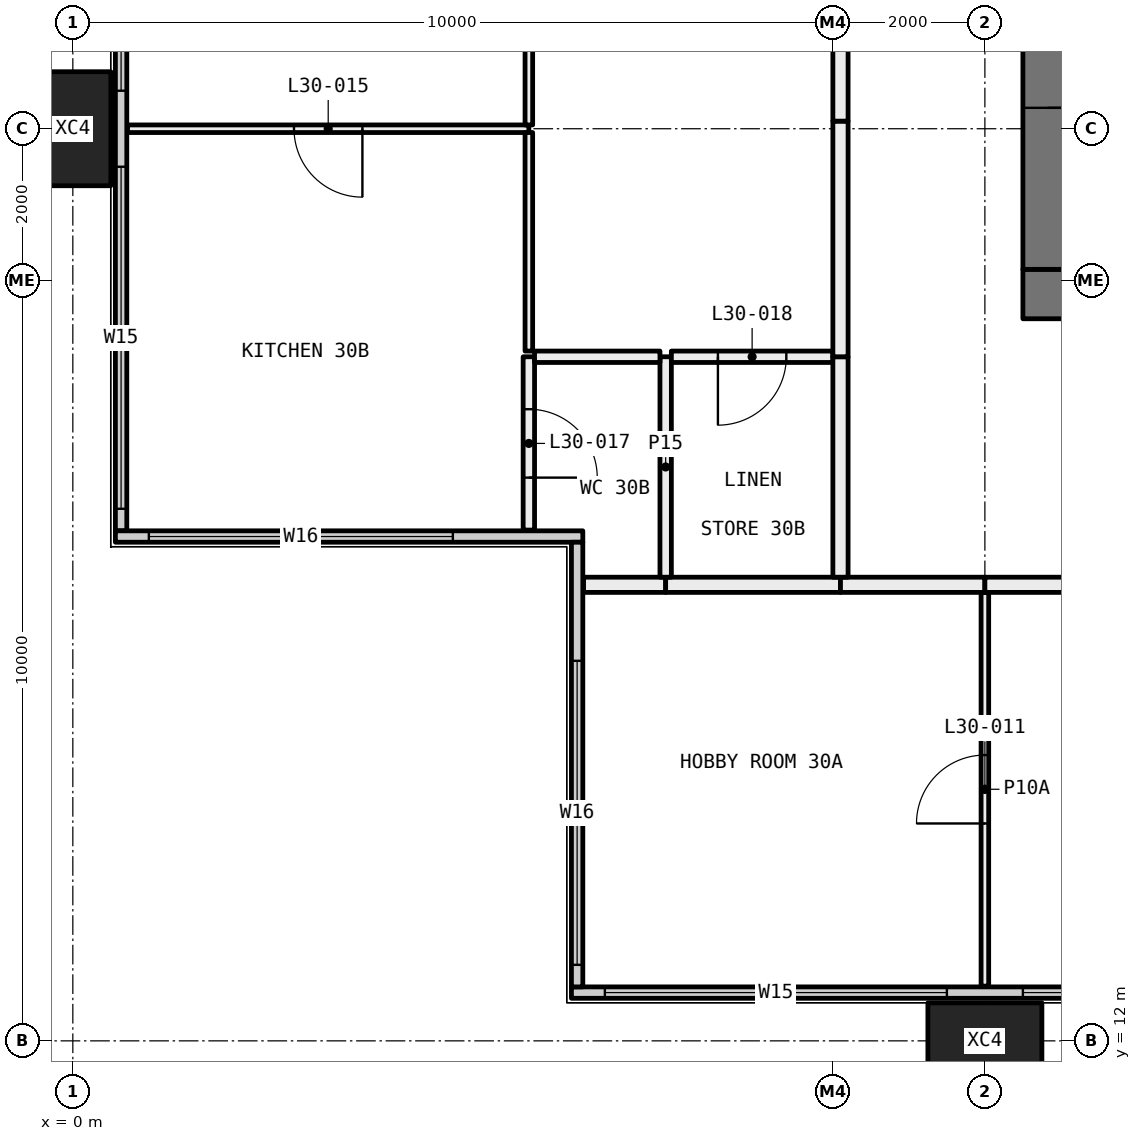
"""IFC4 building model, lengths in metres.
Left out: names, types, materials, properties, quantities, classifications, styles, units other than length and angle.
Written with IfcOpenShell. Run it as: python <this file> out.ifc"""

import sys

from ifc_helpers import new_model, si_unit, direction, frame, frame_2d, origin, origin_2d, place, context, subcontext, project, spatial, rectangle, hollow_rectangle, extrude, element, fill, save


model = new_model("IFC4")
c1 = context("Model", 3, precision=1e-05, world=origin(), true_north=direction((0.0, 1.0)))
c2 = subcontext(c1, "Body", "Model", "MODEL_VIEW")
j1 = project(units=[si_unit("LENGTHUNIT", "METRE"), si_unit("PLANEANGLEUNIT", "RADIAN")], contexts=[c1])
p1 = place(None, origin())
s1 = spatial("IfcSite", under=j1, at=p1, CompositionType="ELEMENT")
p2 = place(p1, origin())
s2 = spatial("IfcBuilding", under=s1, at=p2, CompositionType="ELEMENT")
p3 = place(p2, frame((0.0, 0.0, 117.3)))
s3 = spatial("IfcBuildingStorey", under=s2, at=p3, CompositionType="ELEMENT", Elevation=117.3)
for number, where, z_axis, x_axis in (
    (1, (0.0, 24.0, -0.4), (0.0, 0.0, 1.0), (0.0, 1.0, 0.0)),
    (2, (12.0, 12.0, -0.4), (0.0, 0.0, 1.0), (1.0, 0.0, 0.0)),
):
    element("IfcColumn", number, at=place(p3, frame(where, z_axis=z_axis, x_axis=x_axis)), inside=s3, PredefinedType="COLUMN", context=c2, shape_type="SweptSolid", body=[
        extrude(hollow_rectangle(XDim=1.5, YDim=1.0, WallThickness=0.06, at=origin_2d()), origin(), (0.0, 0.0, 1.0), 3.45),
    ])
p4 = place(p3, frame((6.56, 12.635, 0.0), z_axis=(0.0, 0.0, 1.0), x_axis=(1.0, 0.0, 0.0)))
e3 = element("IfcWall", 3, at=p4, inside=s3, PredefinedType="ELEMENTEDWALL", context=c2, shape_type="SweptSolid", body=[
    extrude(rectangle(XDim=58.88, YDim=0.15, at=frame_2d((29.44, 0.0))), origin(), (0.0, 0.0, 1.0), 3.05),
])
p5 = place(p4, frame((0.44, 0.0, 0.45)))
e4 = element("IfcOpeningElement", 4, at=p5, cuts=e3, PredefinedType="OPENING", context=c2, shape_type="SweptSolid", body=[
    extrude(rectangle(XDim=4.5, YDim=2.55, at=frame_2d((2.25, 1.275))), frame((0.0, 0.085, 0.0), z_axis=(0.0, -1.0, 0.0), x_axis=(1.0, 0.0, 0.0)), (0.0, 0.0, 1.0), 0.17),
])
p6 = place(p4, frame((5.94, 0.0, 0.45)))
e5 = element("IfcOpeningElement", 5, at=p6, cuts=e3, PredefinedType="OPENING", context=c2, shape_type="SweptSolid", body=[
    extrude(rectangle(XDim=1.75, YDim=2.55, at=frame_2d((0.875, 1.275))), frame((0.0, 0.085, 0.0), z_axis=(0.0, -1.0, 0.0), x_axis=(1.0, 0.0, 0.0)), (0.0, 0.0, 1.0), 0.17),
])
p7 = place(p4, frame((15.19, 0.0, 0.45)))
e6 = element("IfcOpeningElement", 6, at=p7, cuts=e3, PredefinedType="OPENING", context=c2, shape_type="SweptSolid", body=[
    extrude(rectangle(XDim=1.75, YDim=2.55, at=frame_2d((0.875, 1.275))), frame((0.0, 0.085, 0.0), z_axis=(0.0, -1.0, 0.0), x_axis=(1.0, 0.0, 0.0)), (0.0, 0.0, 1.0), 0.17),
])
p8 = place(p4, frame((17.94, 0.0, 0.45)))
e7 = element("IfcOpeningElement", 7, at=p8, cuts=e3, PredefinedType="OPENING", context=c2, shape_type="SweptSolid", body=[
    extrude(rectangle(XDim=1.75, YDim=2.55, at=frame_2d((0.875, 1.275))), frame((0.0, 0.085, 0.0), z_axis=(0.0, -1.0, 0.0), x_axis=(1.0, 0.0, 0.0)), (0.0, 0.0, 1.0), 0.17),
])
p9 = place(p4, frame((27.19, 0.0, 0.45)))
e8 = element("IfcOpeningElement", 8, at=p9, cuts=e3, PredefinedType="OPENING", context=c2, shape_type="SweptSolid", body=[
    extrude(rectangle(XDim=1.75, YDim=2.55, at=frame_2d((0.875, 1.275))), frame((0.0, 0.085, 0.0), z_axis=(0.0, -1.0, 0.0), x_axis=(1.0, 0.0, 0.0)), (0.0, 0.0, 1.0), 0.17),
])
p10 = place(p4, frame((29.94, 0.0, 0.45)))
e9 = element("IfcOpeningElement", 9, at=p10, cuts=e3, PredefinedType="OPENING", context=c2, shape_type="SweptSolid", body=[
    extrude(rectangle(XDim=1.75, YDim=2.55, at=frame_2d((0.875, 1.275))), frame((0.0, 0.085, 0.0), z_axis=(0.0, -1.0, 0.0), x_axis=(1.0, 0.0, 0.0)), (0.0, 0.0, 1.0), 0.17),
])
p11 = place(p4, frame((39.19, 0.0, 0.45)))
e10 = element("IfcOpeningElement", 10, at=p11, cuts=e3, PredefinedType="OPENING", context=c2, shape_type="SweptSolid", body=[
    extrude(rectangle(XDim=1.75, YDim=2.55, at=frame_2d((0.875, 1.275))), frame((0.0, 0.085, 0.0), z_axis=(0.0, -1.0, 0.0), x_axis=(1.0, 0.0, 0.0)), (0.0, 0.0, 1.0), 0.17),
])
p12 = place(p4, frame((41.94, 0.0, 0.45)))
e11 = element("IfcOpeningElement", 11, at=p12, cuts=e3, PredefinedType="OPENING", context=c2, shape_type="SweptSolid", body=[
    extrude(rectangle(XDim=1.75, YDim=2.55, at=frame_2d((0.875, 1.275))), frame((0.0, 0.085, 0.0), z_axis=(0.0, -1.0, 0.0), x_axis=(1.0, 0.0, 0.0)), (0.0, 0.0, 1.0), 0.17),
])
p13 = place(p4, frame((51.19, 0.0, 0.45)))
e12 = element("IfcOpeningElement", 12, at=p13, cuts=e3, PredefinedType="OPENING", context=c2, shape_type="SweptSolid", body=[
    extrude(rectangle(XDim=1.75, YDim=2.55, at=frame_2d((0.875, 1.275))), frame((0.0, 0.085, 0.0), z_axis=(0.0, -1.0, 0.0), x_axis=(1.0, 0.0, 0.0)), (0.0, 0.0, 1.0), 0.17),
])
p14 = place(p4, frame((53.94, 0.0, 0.45)))
e13 = element("IfcOpeningElement", 13, at=p14, cuts=e3, PredefinedType="OPENING", context=c2, shape_type="SweptSolid", body=[
    extrude(rectangle(XDim=4.5, YDim=2.55, at=frame_2d((2.25, 1.275))), frame((0.0, 0.085, 0.0), z_axis=(0.0, -1.0, 0.0), x_axis=(1.0, 0.0, 0.0)), (0.0, 0.0, 1.0), 0.17),
])
p15 = place(p3, frame((0.635, 18.71, 0.0), z_axis=(0.0, 0.0, 1.0), x_axis=(0.0, 1.0, 0.0)))
e14 = element("IfcWall", 14, at=p15, inside=s3, PredefinedType="ELEMENTEDWALL", context=c2, shape_type="SweptSolid", body=[
    extrude(rectangle(XDim=22.58, YDim=0.15, at=frame_2d((11.29, 0.0))), origin(), (0.0, 0.0, 1.0), 3.05),
])
p16 = place(p15, frame((0.29, 0.0, 0.45)))
e15 = element("IfcOpeningElement", 15, at=p16, cuts=e14, PredefinedType="OPENING", context=c2, shape_type="SweptSolid", body=[
    extrude(rectangle(XDim=4.5, YDim=2.55, at=frame_2d((2.25, 1.275))), frame((0.0, 0.085, 0.0), z_axis=(0.0, -1.0, 0.0), x_axis=(1.0, 0.0, 0.0)), (0.0, 0.0, 1.0), 0.17),
])
p17 = place(p15, frame((5.79, 0.0, 0.45)))
e16 = element("IfcOpeningElement", 16, at=p17, cuts=e14, PredefinedType="OPENING", context=c2, shape_type="SweptSolid", body=[
    extrude(rectangle(XDim=1.75, YDim=2.55, at=frame_2d((0.875, 1.275))), frame((0.0, 0.085, 0.0), z_axis=(0.0, -1.0, 0.0), x_axis=(1.0, 0.0, 0.0)), (0.0, 0.0, 1.0), 0.17),
])
p18 = place(p15, frame((15.04, 0.0, 0.45)))
e17 = element("IfcOpeningElement", 17, at=p18, cuts=e14, PredefinedType="OPENING", context=c2, shape_type="SweptSolid", body=[
    extrude(rectangle(XDim=1.75, YDim=2.55, at=frame_2d((0.875, 1.275))), frame((0.0, 0.085, 0.0), z_axis=(0.0, -1.0, 0.0), x_axis=(1.0, 0.0, 0.0)), (0.0, 0.0, 1.0), 0.17),
])
p19 = place(p15, frame((17.79, 0.0, 0.45)))
e18 = element("IfcOpeningElement", 18, at=p19, cuts=e14, PredefinedType="OPENING", context=c2, shape_type="SweptSolid", body=[
    extrude(rectangle(XDim=4.5, YDim=2.55, at=frame_2d((2.25, 1.275))), frame((0.0, 0.085, 0.0), z_axis=(0.0, -1.0, 0.0), x_axis=(1.0, 0.0, 0.0)), (0.0, 0.0, 1.0), 0.17),
])
p20 = place(p3, frame((0.56, 18.635, 0.0), z_axis=(0.0, 0.0, 1.0), x_axis=(1.0, 0.0, 0.0)))
e19 = element("IfcWall", 19, at=p20, inside=s3, PredefinedType="ELEMENTEDWALL", context=c2, shape_type="SweptSolid", body=[
    extrude(rectangle(XDim=6.15, YDim=0.15, at=frame_2d((3.075, 0.0))), origin(), (0.0, 0.0, 1.0), 3.05),
])
p21 = place(p20, frame((0.44, 0.0, 0.45)))
e20 = element("IfcOpeningElement", 20, at=p21, cuts=e19, PredefinedType="OPENING", context=c2, shape_type="SweptSolid", body=[
    extrude(rectangle(XDim=4.0, YDim=2.55, at=frame_2d((2.0, 1.275))), frame((0.0, 0.085, 0.0), z_axis=(0.0, -1.0, 0.0), x_axis=(1.0, 0.0, 0.0)), (0.0, 0.0, 1.0), 0.17),
])
p22 = place(p3, frame((6.635, 12.71, 0.0), z_axis=(0.0, 0.0, 1.0), x_axis=(0.0, 1.0, 0.0)))
e21 = element("IfcWall", 21, at=p22, inside=s3, PredefinedType="ELEMENTEDWALL", context=c2, shape_type="SweptSolid", body=[
    extrude(rectangle(XDim=5.85, YDim=0.15, at=frame_2d((2.925, 0.0))), origin(), (0.0, 0.0, 1.0), 3.05),
])
p23 = place(p22, frame((0.29, 0.0, 0.45)))
e22 = element("IfcOpeningElement", 22, at=p23, cuts=e21, PredefinedType="OPENING", context=c2, shape_type="SweptSolid", body=[
    extrude(rectangle(XDim=4.0, YDim=2.55, at=frame_2d((2.0, 1.275))), frame((0.0, 0.085, 0.0), z_axis=(0.0, -1.0, 0.0), x_axis=(1.0, 0.0, 0.0)), (0.0, 0.0, 1.0), 0.17),
])
p24 = place(p3, frame((12.0, 12.72, 0.0), z_axis=(0.0, 0.0, 1.0), x_axis=(0.0, 1.0, 0.0)))
e23 = element("IfcWall", 23, at=p24, inside=s3, PredefinedType="PARTITIONING", context=c2, shape_type="SweptSolid", body=[
    extrude(rectangle(XDim=5.18, YDim=0.1, at=frame_2d((2.59, 0.0))), origin(), (0.0, 0.0, 1.0), 3.05),
])
p25 = place(p24, frame((2.14, 0.0, 0.0)))
e24 = element("IfcOpeningElement", 24, at=p25, cuts=e23, PredefinedType="OPENING", context=c2, shape_type="SweptSolid", body=[
    extrude(rectangle(XDim=0.9, YDim=2.1, at=frame_2d((0.45, 1.05))), frame((0.0, 0.06, 0.0), z_axis=(0.0, -1.0, 0.0), x_axis=(1.0, 0.0, 0.0)), (0.0, 0.0, 1.0), 0.12),
])
p26 = place(p3, frame((7.8, 18.0, 0.0), z_axis=(0.0, 0.0, 1.0), x_axis=(-1.0, 0.0, 0.0)))
e25 = element("IfcWall", 25, at=p26, inside=s3, PredefinedType="PARTITIONING", context=c2, shape_type="SweptSolid", body=[
    extrude(rectangle(XDim=1.08, YDim=0.2, at=frame_2d((0.54, 0.0))), origin(), (0.0, 0.0, 1.0), 3.05),
])
p27 = place(p3, frame((10.1, 18.0, 0.0), z_axis=(0.0, 0.0, 1.0), x_axis=(-1.0, 0.0, 0.0)))
e26 = element("IfcWall", 26, at=p27, inside=s3, PredefinedType="PARTITIONING", context=c2, shape_type="SweptSolid", body=[
    extrude(rectangle(XDim=2.3, YDim=0.2, at=frame_2d((1.15, 0.0))), origin(), (0.0, 0.0, 1.0), 3.05),
])
p28 = place(p3, frame((12.0, 18.0, 0.0), z_axis=(0.0, 0.0, 1.0), x_axis=(-1.0, 0.0, 0.0)))
e27 = element("IfcWall", 27, at=p28, inside=s3, PredefinedType="PARTITIONING", context=c2, shape_type="SweptSolid", body=[
    extrude(rectangle(XDim=1.9, YDim=0.2, at=frame_2d((0.95, 0.0))), origin(), (0.0, 0.0, 1.0), 3.05),
])
p29 = place(p3, frame((18.0, 18.0, 0.0), z_axis=(0.0, 0.0, 1.0), x_axis=(-1.0, 0.0, 0.0)))
e28 = element("IfcWall", 28, at=p29, inside=s3, PredefinedType="PARTITIONING", context=c2, shape_type="SweptSolid", body=[
    extrude(rectangle(XDim=6.0, YDim=0.2, at=frame_2d((3.0, 0.0))), origin(), (0.0, 0.0, 1.0), 3.05),
])
p30 = place(p3, frame((6.0, 24.0, 0.0), z_axis=(0.0, 0.0, 1.0), x_axis=(-1.0, 0.0, 0.0)))
e29 = element("IfcWall", 29, at=p30, inside=s3, PredefinedType="PARTITIONING", context=c2, shape_type="SweptSolid", body=[
    extrude(rectangle(XDim=5.28, YDim=0.1, at=frame_2d((2.64, 0.0))), origin(), (0.0, 0.0, 1.0), 2.45),
])
p31 = place(p30, frame((2.19, 0.0, 0.0)))
e30 = element("IfcOpeningElement", 30, at=p31, cuts=e29, PredefinedType="OPENING", context=c2, shape_type="SweptSolid", body=[
    extrude(rectangle(XDim=0.9, YDim=2.1, at=frame_2d((0.45, 1.05))), frame((0.0, 0.06, 0.0), z_axis=(0.0, -1.0, 0.0), x_axis=(1.0, 0.0, 0.0)), (0.0, 0.0, 1.0), 0.12),
])
p32 = place(p3, frame((6.0, 18.72, 0.0), z_axis=(0.0, 0.0, 1.0), x_axis=(0.0, 1.0, 0.0)))
e31 = element("IfcWall", 31, at=p32, inside=s3, PredefinedType="PARTITIONING", context=c2, shape_type="SweptSolid", body=[
    extrude(rectangle(XDim=2.28, YDim=0.15, at=frame_2d((1.14, 0.0))), origin(), (0.0, 0.0, 1.0), 3.05),
])
p33 = place(p32, frame((0.69, 0.0, 0.0)))
e32 = element("IfcOpeningElement", 32, at=p33, cuts=e31, PredefinedType="OPENING", context=c2, shape_type="SweptSolid", body=[
    extrude(rectangle(XDim=0.9, YDim=2.1, at=frame_2d((0.45, 1.05))), frame((0.0, 0.085, 0.0), z_axis=(0.0, -1.0, 0.0), x_axis=(1.0, 0.0, 0.0)), (0.0, 0.0, 1.0), 0.17),
])
p34 = place(p3, frame((6.0, 21.075, 0.0), z_axis=(0.0, 0.0, 1.0), x_axis=(0.0, 1.0, 0.0)))
e33 = element("IfcWall", 33, at=p34, inside=s3, PredefinedType="PARTITIONING", context=c2, shape_type="SweptSolid", body=[
    extrude(rectangle(XDim=2.875, YDim=0.1, at=frame_2d((1.438, 0.0))), origin(), (0.0, 0.0, 1.0), 2.45),
])
p35 = place(p3, frame((6.0, 24.05, 0.0), z_axis=(0.0, 0.0, 1.0), x_axis=(0.0, 1.0, 0.0)))
e34 = element("IfcWall", 34, at=p35, inside=s3, PredefinedType="PARTITIONING", context=c2, shape_type="SweptSolid", body=[
    extrude(rectangle(XDim=8.95, YDim=0.1, at=frame_2d((4.475, 0.0))), origin(), (0.0, 0.0, 1.0), 2.45),
])
p36 = place(p3, frame((7.8, 18.1, 0.0), z_axis=(0.0, 0.0, 1.0), x_axis=(0.0, 1.0, 0.0)))
e35 = element("IfcWall", 35, at=p36, inside=s3, PredefinedType="PARTITIONING", context=c2, shape_type="SweptSolid", body=[
    extrude(rectangle(XDim=2.9, YDim=0.15, at=frame_2d((1.45, 0.0))), origin(), (0.0, 0.0, 1.0), 3.05),
])
p37 = place(p3, frame((7.725, 21.0, 0.0), z_axis=(0.0, 0.0, 1.0), x_axis=(-1.0, 0.0, 0.0)))
e36 = element("IfcWall", 36, at=p37, inside=s3, PredefinedType="PARTITIONING", context=c2, shape_type="SweptSolid", body=[
    extrude(rectangle(XDim=1.65, YDim=0.15, at=frame_2d((0.825, 0.0))), origin(), (0.0, 0.0, 1.0), 3.05),
])
p38 = place(p3, frame((10.0, 21.0, 0.0), z_axis=(0.0, 0.0, 1.0), x_axis=(-1.0, 0.0, 0.0)))
e37 = element("IfcWall", 37, at=p38, inside=s3, PredefinedType="PARTITIONING", context=c2, shape_type="SweptSolid", body=[
    extrude(rectangle(XDim=2.125, YDim=0.15, at=frame_2d((1.062, 0.0))), origin(), (0.0, 0.0, 1.0), 3.05),
])
p39 = place(p38, frame((0.613, 0.0, 0.0)))
e38 = element("IfcOpeningElement", 38, at=p39, cuts=e37, PredefinedType="OPENING", context=c2, shape_type="SweptSolid", body=[
    extrude(rectangle(XDim=0.9, YDim=2.1, at=frame_2d((0.45, 1.05))), frame((0.0, 0.085, 0.0), z_axis=(0.0, -1.0, 0.0), x_axis=(1.0, 0.0, 0.0)), (0.0, 0.0, 1.0), 0.17),
])
p40 = place(p3, frame((10.1, 18.1, 0.0), z_axis=(0.0, 0.0, 1.0), x_axis=(0.0, 1.0, 0.0)))
e39 = element("IfcWall", 39, at=p40, inside=s3, PredefinedType="PARTITIONING", context=c2, shape_type="SweptSolid", body=[
    extrude(rectangle(XDim=2.9, YDim=0.2, at=frame_2d((1.45, 0.0))), origin(), (0.0, 0.0, 1.0), 3.05),
])
p41 = place(p3, frame((10.1, 21.0, 0.0), z_axis=(0.0, 0.0, 1.0), x_axis=(0.0, 1.0, 0.0)))
e40 = element("IfcWall", 40, at=p41, inside=s3, PredefinedType="PARTITIONING", context=c2, shape_type="SweptSolid", body=[
    extrude(rectangle(XDim=3.1, YDim=0.2, at=frame_2d((1.55, 0.0))), origin(), (0.0, 0.0, 1.0), 2.45),
])
p42 = place(p3, frame((10.1, 24.1, 0.0), z_axis=(0.0, 0.0, 1.0), x_axis=(0.0, 1.0, 0.0)))
e41 = element("IfcWall", 41, at=p42, inside=s3, PredefinedType="PARTITIONING", context=c2, shape_type="SweptSolid", body=[
    extrude(rectangle(XDim=8.9, YDim=0.2, at=frame_2d((4.45, 0.0))), origin(), (0.0, 0.0, 1.0), 3.05),
])
p43 = place(p3, frame((12.5, 21.825, 0.0), z_axis=(0.0, 0.0, 1.0), x_axis=(1.0, 0.0, 0.0)))
e42 = element("IfcWall", 42, at=p43, inside=s3, PredefinedType="SHEAR", context=c2, shape_type="SweptSolid", body=[
    extrude(rectangle(XDim=11.0, YDim=0.65, at=frame_2d((5.5, 0.0))), origin(), (0.0, 0.0, 1.0), 3.05),
])
p44 = place(p3, frame((12.825, 22.15, 0.0), z_axis=(0.0, 0.0, 1.0), x_axis=(0.0, 1.0, 0.0)))
e43 = element("IfcWall", 43, at=p44, inside=s3, PredefinedType="SHEAR", context=c2, shape_type="SweptSolid", body=[
    extrude(rectangle(XDim=15.7, YDim=0.65, at=frame_2d((7.85, 0.0))), origin(), (0.0, 0.0, 1.0), 3.05),
])
p45 = place(p44, frame((8.3, 0.0, 0.0)))
e44 = element("IfcOpeningElement", 44, at=p45, cuts=e43, PredefinedType="OPENING", context=c2, shape_type="SweptSolid", body=[
    extrude(rectangle(XDim=1.6, YDim=2.1, at=frame_2d((0.8, 1.05))), frame((0.0, 0.335, 0.0), z_axis=(0.0, -1.0, 0.0), x_axis=(1.0, 0.0, 0.0)), (0.0, 0.0, 1.0), 0.67),
])
p46 = place(p44, frame((2.125, 0.0, 0.0)))
e45 = element("IfcOpeningElement", 45, at=p46, cuts=e43, PredefinedType="OPENING", context=c2, shape_type="SweptSolid", body=[
    extrude(rectangle(XDim=1.0, YDim=2.1, at=frame_2d((0.5, 1.05))), frame((0.0, 0.335, 0.0), z_axis=(0.0, -1.0, 0.0), x_axis=(1.0, 0.0, 0.0)), (0.0, 0.0, 1.0), 0.67),
])
p47 = place(p5, origin())
e46 = element("IfcWindow", 46, at=p47, inside=s3, PartitioningType="SINGLE_PANEL", PredefinedType="WINDOW", context=c2, shape_type="SweptSolid", body=[
    extrude(rectangle(XDim=4.5, YDim=2.55, at=frame_2d((2.25, 1.275))), frame((0.0, 0.03, 0.0), z_axis=(0.0, -1.0, 0.0), x_axis=(1.0, 0.0, 0.0)), (0.0, 0.0, 1.0), 0.06),
])
fill(e4, e46)
p48 = place(p6, origin())
e47 = element("IfcWindow", 47, at=p48, inside=s3, PartitioningType="SINGLE_PANEL", PredefinedType="WINDOW", context=c2, shape_type="SweptSolid", body=[
    extrude(rectangle(XDim=1.75, YDim=2.55, at=frame_2d((0.875, 1.275))), frame((0.0, 0.03, 0.0), z_axis=(0.0, -1.0, 0.0), x_axis=(1.0, 0.0, 0.0)), (0.0, 0.0, 1.0), 0.06),
])
fill(e5, e47)
p49 = place(p16, origin())
e48 = element("IfcWindow", 48, at=p49, inside=s3, PartitioningType="SINGLE_PANEL", PredefinedType="WINDOW", context=c2, shape_type="SweptSolid", body=[
    extrude(rectangle(XDim=4.5, YDim=2.55, at=frame_2d((2.25, 1.275))), frame((0.0, 0.03, 0.0), z_axis=(0.0, -1.0, 0.0), x_axis=(1.0, 0.0, 0.0)), (0.0, 0.0, 1.0), 0.06),
])
fill(e15, e48)
p50 = place(p17, origin())
e49 = element("IfcWindow", 49, at=p50, inside=s3, PartitioningType="SINGLE_PANEL", PredefinedType="WINDOW", context=c2, shape_type="SweptSolid", body=[
    extrude(rectangle(XDim=1.75, YDim=2.55, at=frame_2d((0.875, 1.275))), frame((0.0, 0.03, 0.0), z_axis=(0.0, -1.0, 0.0), x_axis=(1.0, 0.0, 0.0)), (0.0, 0.0, 1.0), 0.06),
])
fill(e16, e49)
p51 = place(p21, origin())
e50 = element("IfcWindow", 50, at=p51, inside=s3, PartitioningType="SINGLE_PANEL", PredefinedType="WINDOW", context=c2, shape_type="SweptSolid", body=[
    extrude(rectangle(XDim=4.0, YDim=2.55, at=frame_2d((2.0, 1.275))), frame((0.0, 0.03, 0.0), z_axis=(0.0, -1.0, 0.0), x_axis=(1.0, 0.0, 0.0)), (0.0, 0.0, 1.0), 0.06),
])
fill(e20, e50)
p52 = place(p23, origin())
e51 = element("IfcWindow", 51, at=p52, inside=s3, PartitioningType="SINGLE_PANEL", PredefinedType="WINDOW", context=c2, shape_type="SweptSolid", body=[
    extrude(rectangle(XDim=4.0, YDim=2.55, at=frame_2d((2.0, 1.275))), frame((0.0, 0.03, 0.0), z_axis=(0.0, -1.0, 0.0), x_axis=(1.0, 0.0, 0.0)), (0.0, 0.0, 1.0), 0.06),
])
fill(e22, e51)
p53 = place(p25, origin())
e52 = element("IfcDoor", 52, at=p53, inside=s3, OperationType="SINGLE_SWING_RIGHT", PredefinedType="DOOR", context=c2, shape_type="SweptSolid", body=[
    extrude(rectangle(XDim=0.9, YDim=2.1, at=frame_2d((0.45, 1.05))), frame((0.0, 0.025, 0.0), z_axis=(0.0, -1.0, 0.0), x_axis=(1.0, 0.0, 0.0)), (0.0, 0.0, 1.0), 0.05),
])
fill(e24, e52)
p54 = place(p31, origin())
e53 = element("IfcDoor", 53, at=p54, inside=s3, OperationType="SINGLE_SWING_RIGHT", PredefinedType="DOOR", context=c2, shape_type="SweptSolid", body=[
    extrude(rectangle(XDim=0.9, YDim=2.1, at=frame_2d((0.45, 1.05))), frame((0.0, 0.025, 0.0), z_axis=(0.0, -1.0, 0.0), x_axis=(1.0, 0.0, 0.0)), (0.0, 0.0, 1.0), 0.05),
])
fill(e30, e53)
p55 = place(p33, frame((0.9, 0.0, 0.0), x_axis=(-1.0, 0.0, 0.0)))
e54 = element("IfcDoor", 54, at=p55, inside=s3, OperationType="SINGLE_SWING_LEFT", PredefinedType="DOOR", context=c2, shape_type="SweptSolid", body=[
    extrude(rectangle(XDim=0.9, YDim=2.1, at=frame_2d((0.45, 1.05))), frame((0.0, 0.025, 0.0), z_axis=(0.0, -1.0, 0.0), x_axis=(1.0, 0.0, 0.0)), (0.0, 0.0, 1.0), 0.05),
])
fill(e32, e54)
p56 = place(p39, origin())
e55 = element("IfcDoor", 55, at=p56, inside=s3, OperationType="SINGLE_SWING_LEFT", PredefinedType="DOOR", context=c2, shape_type="SweptSolid", body=[
    extrude(rectangle(XDim=0.9, YDim=2.1, at=frame_2d((0.45, 1.05))), frame((0.0, 0.025, 0.0), z_axis=(0.0, -1.0, 0.0), x_axis=(1.0, 0.0, 0.0)), (0.0, 0.0, 1.0), 0.05),
])
fill(e38, e55)
p57 = place(p46, frame((1.0, 0.0, 0.0), x_axis=(-1.0, 0.0, 0.0)))
e56 = element("IfcDoor", 56, at=p57, inside=s3, OperationType="SINGLE_SWING_LEFT", PredefinedType="DOOR", context=c2, shape_type="SweptSolid", body=[
    extrude(rectangle(XDim=1.0, YDim=2.1, at=frame_2d((0.5, 1.05))), frame((0.0, 0.025, 0.0), z_axis=(0.0, -1.0, 0.0), x_axis=(1.0, 0.0, 0.0)), (0.0, 0.0, 1.0), 0.05),
])
fill(e45, e56)
save(model, sys.argv[1])
